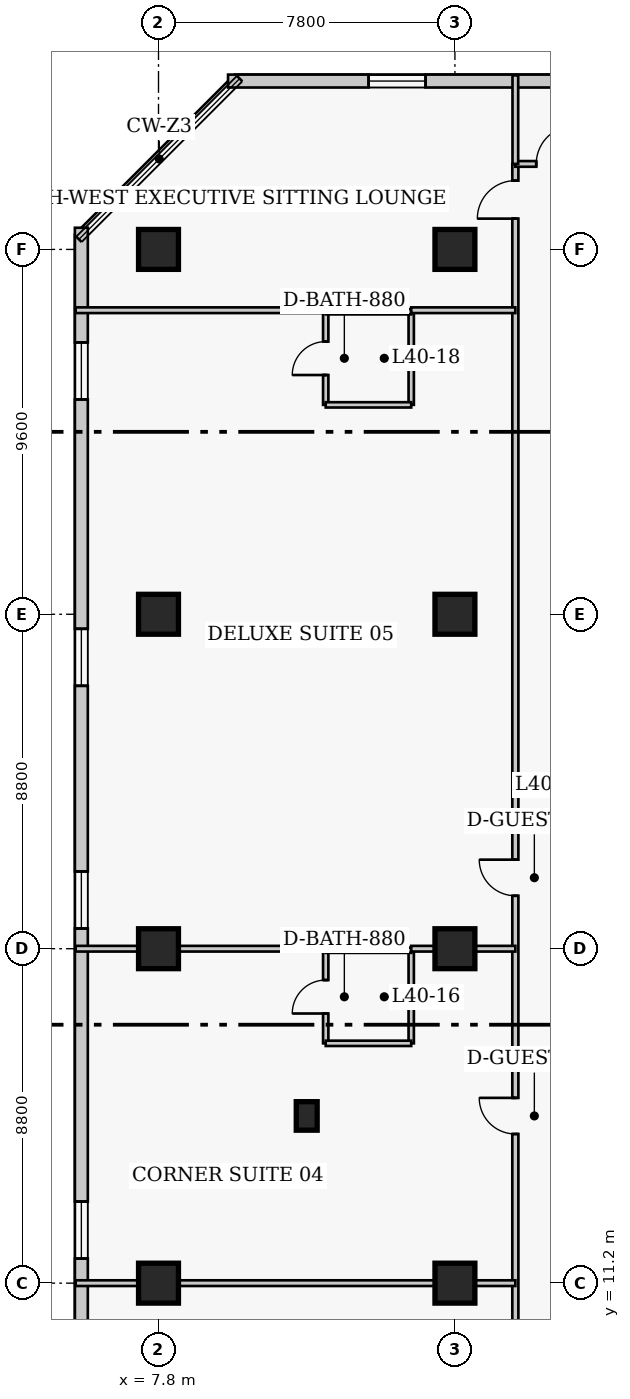
"""IFC4 building model, lengths in metres.
Left out: names, types, materials, properties, quantities, classifications, styles, units other than length and angle.
Written with IfcOpenShell. Run it as: python <this file> out.ifc"""

import sys

from ifc_helpers import new_model, si_unit, direction, frame, frame_2d, origin, origin_2d, place, context, subcontext, project, spatial, rectangle, extrude, element, fill, save


model = new_model("IFC4")
c1 = context("Model", 3, precision=1e-05, world=origin(), true_north=direction((0.0, 1.0)))
c2 = subcontext(c1, "Body", "Model", "MODEL_VIEW")
j1 = project(units=[si_unit("LENGTHUNIT", "METRE"), si_unit("PLANEANGLEUNIT", "RADIAN")], contexts=[c1])
p1 = place(None, origin())
s1 = spatial("IfcSite", under=j1, at=p1, CompositionType="ELEMENT")
p2 = place(p1, origin())
s2 = spatial("IfcBuilding", under=s1, at=p2, CompositionType="ELEMENT")
p3 = place(p2, frame((0.0, 0.0, 161.2)))
s3 = spatial("IfcBuildingStorey", under=s2, at=p3, CompositionType="ELEMENT", Elevation=161.2)
for number, where, z_axis, x_axis in (
    (1, (7.8, 11.2, 0.0), (0.0, 0.0, 1.0), (1.0, 0.0, 0.0)),
    (2, (7.8, 20.0, 0.0), (0.0, 0.0, 1.0), (1.0, 0.0, 0.0)),
    (3, (7.8, 28.8, 0.0), (0.0, 0.0, 1.0), (1.0, 0.0, 0.0)),
    (4, (7.8, 38.4, 0.0), (0.0, 0.0, 1.0), (1.0, 0.0, 0.0)),
    (5, (15.6, 11.2, 0.0), (0.0, 0.0, 1.0), (1.0, 0.0, 0.0)),
    (6, (15.6, 20.0, 0.0), (0.0, 0.0, 1.0), (1.0, 0.0, 0.0)),
    (7, (15.6, 28.8, 0.0), (0.0, 0.0, 1.0), (1.0, 0.0, 0.0)),
    (8, (15.6, 38.4, 0.0), (0.0, 0.0, 1.0), (1.0, 0.0, 0.0)),
):
    element("IfcColumn", number, at=place(p3, frame(where, z_axis=z_axis, x_axis=x_axis)), inside=s3, PredefinedType="COLUMN", context=c2, shape_type="SweptSolid", body=[
        extrude(rectangle(XDim=1.05, YDim=1.05, at=origin_2d()), origin(), (0.0, 0.0, 1.0), 3.8),
    ])
p4 = place(p3, frame((11.7, 15.6, 0.0), z_axis=(0.0, 0.0, 1.0), x_axis=(1.0, 0.0, 0.0)))
e9 = element("IfcColumn", 9, at=p4, inside=s3, PredefinedType="PILASTER", context=c2, shape_type="SweptSolid", body=[
    extrude(rectangle(XDim=0.55, YDim=0.75, at=origin_2d()), origin(), (0.0, 0.0, 1.0), 3.8),
])
p5 = place(p3, frame((36.32, 42.83, 0.0), z_axis=(0.0, 0.0, 1.0), x_axis=(-1.0, 0.0, 0.0)))
e10 = element("IfcWall", 10, at=p5, inside=s3, PredefinedType="SOLIDWALL", context=c2, shape_type="SweptSolid", body=[
    extrude(rectangle(XDim=26.69, YDim=0.34, at=frame_2d((13.345, 0.0))), origin(), (0.0, 0.0, 1.0), 3.55),
])
p6 = place(p5, frame((2.548, 0.0, 0.85)))
e11 = element("IfcOpeningElement", 11, at=p6, cuts=e10, PredefinedType="OPENING", context=c2, shape_type="SweptSolid", body=[
    extrude(rectangle(XDim=1.5, YDim=1.75, at=frame_2d((0.75, 0.875))), frame((0.0, 0.18, 0.0), z_axis=(0.0, -1.0, 0.0), x_axis=(1.0, 0.0, 0.0)), (0.0, 0.0, 1.0), 0.36),
])
p7 = place(p5, frame((12.595, 0.0, 0.85)))
e12 = element("IfcOpeningElement", 12, at=p7, cuts=e10, PredefinedType="OPENING", context=c2, shape_type="SweptSolid", body=[
    extrude(rectangle(XDim=1.5, YDim=1.75, at=frame_2d((0.75, 0.875))), frame((0.0, 0.18, 0.0), z_axis=(0.0, -1.0, 0.0), x_axis=(1.0, 0.0, 0.0)), (0.0, 0.0, 1.0), 0.36),
])
p8 = place(p5, frame((21.492, 0.0, 0.85)))
e13 = element("IfcOpeningElement", 13, at=p8, cuts=e10, PredefinedType="OPENING", context=c2, shape_type="SweptSolid", body=[
    extrude(rectangle(XDim=1.5, YDim=1.75, at=frame_2d((0.75, 0.875))), frame((0.0, 0.18, 0.0), z_axis=(0.0, -1.0, 0.0), x_axis=(1.0, 0.0, 0.0)), (0.0, 0.0, 1.0), 0.36),
])
p9 = place(p3, frame((5.77, 38.97, 0.0), z_axis=(0.0, 0.0, 1.0), x_axis=(0.0, -1.0, 0.0)))
e14 = element("IfcWall", 14, at=p9, inside=s3, PredefinedType="SOLIDWALL", context=c2, shape_type="SweptSolid", body=[
    extrude(rectangle(XDim=30.14, YDim=0.34, at=frame_2d((15.07, 0.0))), origin(), (0.0, 0.0, 1.0), 3.55),
])
p10 = place(p9, frame((3.018, 0.0, 0.85)))
e15 = element("IfcOpeningElement", 15, at=p10, cuts=e14, PredefinedType="OPENING", context=c2, shape_type="SweptSolid", body=[
    extrude(rectangle(XDim=1.5, YDim=1.75, at=frame_2d((0.75, 0.875))), frame((0.0, 0.18, 0.0), z_axis=(0.0, -1.0, 0.0), x_axis=(1.0, 0.0, 0.0)), (0.0, 0.0, 1.0), 0.36),
])
p11 = place(p9, frame((10.552, 0.0, 0.85)))
e16 = element("IfcOpeningElement", 16, at=p11, cuts=e14, PredefinedType="OPENING", context=c2, shape_type="SweptSolid", body=[
    extrude(rectangle(XDim=1.5, YDim=1.75, at=frame_2d((0.75, 0.875))), frame((0.0, 0.18, 0.0), z_axis=(0.0, -1.0, 0.0), x_axis=(1.0, 0.0, 0.0)), (0.0, 0.0, 1.0), 0.36),
])
p12 = place(p9, frame((16.938, 0.0, 0.85)))
e17 = element("IfcOpeningElement", 17, at=p12, cuts=e14, PredefinedType="OPENING", context=c2, shape_type="SweptSolid", body=[
    extrude(rectangle(XDim=1.5, YDim=1.75, at=frame_2d((0.75, 0.875))), frame((0.0, 0.18, 0.0), z_axis=(0.0, -1.0, 0.0), x_axis=(1.0, 0.0, 0.0)), (0.0, 0.0, 1.0), 0.36),
])
p13 = place(p9, frame((25.623, 0.0, 0.85)))
e18 = element("IfcOpeningElement", 18, at=p13, cuts=e14, PredefinedType="OPENING", context=c2, shape_type="SweptSolid", body=[
    extrude(rectangle(XDim=1.5, YDim=1.75, at=frame_2d((0.75, 0.875))), frame((0.0, 0.18, 0.0), z_axis=(0.0, -1.0, 0.0), x_axis=(1.0, 0.0, 0.0)), (0.0, 0.0, 1.0), 0.36),
])
p14 = place(p3, frame((17.19, 6.85, 0.0), z_axis=(0.0, 0.0, 1.0), x_axis=(0.0, 1.0, 0.0)))
e19 = element("IfcWall", 19, at=p14, inside=s3, PredefinedType="PARTITIONING", context=c2, shape_type="SweptSolid", body=[
    extrude(rectangle(XDim=33.8, YDim=0.16, at=frame_2d((16.9, 0.0))), origin(), (0.0, 0.0, 1.0), 3.55),
])
p15 = place(p14, frame((1.7, 0.0, 0.0)))
e20 = element("IfcOpeningElement", 20, at=p15, cuts=e19, PredefinedType="OPENING", context=c2, shape_type="SweptSolid", body=[
    extrude(rectangle(XDim=0.95, YDim=2.1, at=frame_2d((0.475, 1.05))), frame((0.0, 0.09, 0.0), z_axis=(0.0, -1.0, 0.0), x_axis=(1.0, 0.0, 0.0)), (0.0, 0.0, 1.0), 0.18),
])
p16 = place(p14, frame((8.275, 0.0, 0.0)))
e21 = element("IfcOpeningElement", 21, at=p16, cuts=e19, PredefinedType="OPENING", context=c2, shape_type="SweptSolid", body=[
    extrude(rectangle(XDim=0.95, YDim=2.1, at=frame_2d((0.475, 1.05))), frame((0.0, 0.09, 0.0), z_axis=(0.0, -1.0, 0.0), x_axis=(1.0, 0.0, 0.0)), (0.0, 0.0, 1.0), 0.18),
])
p17 = place(p14, frame((14.543, 0.0, 0.0)))
e22 = element("IfcOpeningElement", 22, at=p17, cuts=e19, PredefinedType="OPENING", context=c2, shape_type="SweptSolid", body=[
    extrude(rectangle(XDim=0.95, YDim=2.1, at=frame_2d((0.475, 1.05))), frame((0.0, 0.09, 0.0), z_axis=(0.0, -1.0, 0.0), x_axis=(1.0, 0.0, 0.0)), (0.0, 0.0, 1.0), 0.18),
])
p18 = place(p14, frame((32.36, 0.0, 0.0)))
e23 = element("IfcOpeningElement", 23, at=p18, cuts=e19, PredefinedType="OPENING", context=c2, shape_type="SweptSolid", body=[
    extrude(rectangle(XDim=1.0, YDim=2.15, at=frame_2d((0.5, 1.075))), frame((0.0, 0.09, 0.0), z_axis=(0.0, -1.0, 0.0), x_axis=(1.0, 0.0, 0.0)), (0.0, 0.0, 1.0), 0.18),
])
p19 = place(p3, frame((17.19, 40.65, 0.0), z_axis=(0.0, 0.0, 1.0), x_axis=(1.0, 0.0, 0.0)))
e24 = element("IfcWall", 24, at=p19, inside=s3, PredefinedType="PARTITIONING", context=c2, shape_type="SweptSolid", body=[
    extrude(rectangle(XDim=4.91, YDim=0.15, at=frame_2d((2.455, 0.0))), origin(), (0.0, 0.0, 1.0), 3.55),
])
p20 = place(p19, frame((0.55, 0.0, 0.0)))
e25 = element("IfcOpeningElement", 25, at=p20, cuts=e24, PredefinedType="OPENING", context=c2, shape_type="SweptSolid", body=[
    extrude(rectangle(XDim=1.0, YDim=2.15, at=frame_2d((0.5, 1.075))), frame((0.0, 0.085, 0.0), z_axis=(0.0, -1.0, 0.0), x_axis=(1.0, 0.0, 0.0)), (0.0, 0.0, 1.0), 0.17),
])
p21 = place(p3, frame((17.19, 40.65, 0.0), z_axis=(0.0, 0.0, 1.0), x_axis=(0.0, 1.0, 0.0)))
e26 = element("IfcWall", 26, at=p21, inside=s3, PredefinedType="PARTITIONING", context=c2, shape_type="SweptSolid", body=[
    extrude(rectangle(XDim=2.33, YDim=0.15, at=frame_2d((1.165, 0.0))), origin(), (0.0, 0.0, 1.0), 3.55),
])
p22 = place(p3, frame((5.62, 11.2, 0.0), z_axis=(0.0, 0.0, 1.0), x_axis=(1.0, 0.0, 0.0)))
e27 = element("IfcWall", 27, at=p22, inside=s3, PredefinedType="PARTITIONING", context=c2, shape_type="SweptSolid", body=[
    extrude(rectangle(XDim=11.57, YDim=0.15, at=frame_2d((5.785, 0.0))), origin(), (0.0, 0.0, 1.0), 2.778),
])
p23 = place(p3, frame((12.2, 17.51, 0.0), z_axis=(0.0, 0.0, 1.0), x_axis=(0.0, 1.0, 0.0)))
e28 = element("IfcWall", 28, at=p23, inside=s3, PredefinedType="PLUMBINGWALL", context=c2, shape_type="SweptSolid", body=[
    extrude(rectangle(XDim=2.45, YDim=0.14, at=frame_2d((1.225, 0.0))), origin(), (0.0, 0.0, 1.0), 3.55),
])
p24 = place(p23, frame((0.785, 0.0, 0.0)))
e29 = element("IfcOpeningElement", 29, at=p24, cuts=e28, PredefinedType="OPENING", context=c2, shape_type="SweptSolid", body=[
    extrude(rectangle(XDim=0.88, YDim=2.05, at=frame_2d((0.44, 1.025))), frame((0.0, 0.08, 0.0), z_axis=(0.0, -1.0, 0.0), x_axis=(1.0, 0.0, 0.0)), (0.0, 0.0, 1.0), 0.16),
])
p25 = place(p3, frame((14.45, 17.51, 0.0), z_axis=(0.0, 0.0, 1.0), x_axis=(0.0, 1.0, 0.0)))
e30 = element("IfcWall", 30, at=p25, inside=s3, PredefinedType="PLUMBINGWALL", context=c2, shape_type="SweptSolid", body=[
    extrude(rectangle(XDim=2.45, YDim=0.14, at=frame_2d((1.225, 0.0))), origin(), (0.0, 0.0, 1.0), 3.55),
])
p26 = place(p3, frame((12.2, 17.51, 0.0), z_axis=(0.0, 0.0, 1.0), x_axis=(1.0, 0.0, 0.0)))
e31 = element("IfcWall", 31, at=p26, inside=s3, PredefinedType="PLUMBINGWALL", context=c2, shape_type="SweptSolid", body=[
    extrude(rectangle(XDim=2.25, YDim=0.14, at=frame_2d((1.125, 0.0))), origin(), (0.0, 0.0, 1.0), 3.55),
])
p27 = place(p3, frame((12.2, 19.96, 0.0), z_axis=(0.0, 0.0, 1.0), x_axis=(1.0, 0.0, 0.0)))
e32 = element("IfcWall", 32, at=p27, inside=s3, PredefinedType="PLUMBINGWALL", context=c2, shape_type="SweptSolid", body=[
    extrude(rectangle(XDim=2.25, YDim=0.14, at=frame_2d((1.125, 0.0))), origin(), (0.0, 0.0, 1.0), 2.9),
])
p28 = place(p3, frame((5.62, 20.0, 0.0), z_axis=(0.0, 0.0, 1.0), x_axis=(1.0, 0.0, 0.0)))
e33 = element("IfcWall", 33, at=p28, inside=s3, PredefinedType="PARTITIONING", context=c2, shape_type="SweptSolid", body=[
    extrude(rectangle(XDim=6.58, YDim=0.15, at=frame_2d((3.29, 0.0))), origin(), (0.0, 0.0, 1.0), 2.778),
])
p29 = place(p3, frame((14.45, 20.0, 0.0), z_axis=(0.0, 0.0, 1.0), x_axis=(1.0, 0.0, 0.0)))
e34 = element("IfcWall", 34, at=p29, inside=s3, PredefinedType="PARTITIONING", context=c2, shape_type="SweptSolid", body=[
    extrude(rectangle(XDim=2.74, YDim=0.15, at=frame_2d((1.37, 0.0))), origin(), (0.0, 0.0, 1.0), 2.778),
])
p30 = place(p3, frame((12.2, 34.31, 0.0), z_axis=(0.0, 0.0, 1.0), x_axis=(0.0, 1.0, 0.0)))
e35 = element("IfcWall", 35, at=p30, inside=s3, PredefinedType="PLUMBINGWALL", context=c2, shape_type="SweptSolid", body=[
    extrude(rectangle(XDim=2.45, YDim=0.14, at=frame_2d((1.225, 0.0))), origin(), (0.0, 0.0, 1.0), 3.55),
])
p31 = place(p30, frame((0.785, 0.0, 0.0)))
e36 = element("IfcOpeningElement", 36, at=p31, cuts=e35, PredefinedType="OPENING", context=c2, shape_type="SweptSolid", body=[
    extrude(rectangle(XDim=0.88, YDim=2.05, at=frame_2d((0.44, 1.025))), frame((0.0, 0.08, 0.0), z_axis=(0.0, -1.0, 0.0), x_axis=(1.0, 0.0, 0.0)), (0.0, 0.0, 1.0), 0.16),
])
p32 = place(p3, frame((14.45, 34.31, 0.0), z_axis=(0.0, 0.0, 1.0), x_axis=(0.0, 1.0, 0.0)))
e37 = element("IfcWall", 37, at=p32, inside=s3, PredefinedType="PLUMBINGWALL", context=c2, shape_type="SweptSolid", body=[
    extrude(rectangle(XDim=2.45, YDim=0.14, at=frame_2d((1.225, 0.0))), origin(), (0.0, 0.0, 1.0), 3.55),
])
for number, where, z_axis, x_axis in (
    (38, (12.2, 34.31, 0.0), (0.0, 0.0, 1.0), (1.0, 0.0, 0.0)),
    (39, (12.2, 36.76, 0.0), (0.0, 0.0, 1.0), (1.0, 0.0, 0.0)),
):
    element("IfcWall", number, at=place(p3, frame(where, z_axis=z_axis, x_axis=x_axis)), inside=s3, PredefinedType="PLUMBINGWALL", context=c2, shape_type="SweptSolid", body=[
        extrude(rectangle(XDim=2.25, YDim=0.14, at=frame_2d((1.125, 0.0))), origin(), (0.0, 0.0, 1.0), 3.55),
    ])
p33 = place(p3, frame((5.62, 36.8, 0.0), z_axis=(0.0, 0.0, 1.0), x_axis=(1.0, 0.0, 0.0)))
e40 = element("IfcWall", 40, at=p33, inside=s3, PredefinedType="PARTITIONING", context=c2, shape_type="SweptSolid", body=[
    extrude(rectangle(XDim=6.58, YDim=0.15, at=frame_2d((3.29, 0.0))), origin(), (0.0, 0.0, 1.0), 3.55),
])
p34 = place(p3, frame((14.45, 36.8, 0.0), z_axis=(0.0, 0.0, 1.0), x_axis=(1.0, 0.0, 0.0)))
e41 = element("IfcWall", 41, at=p34, inside=s3, PredefinedType="PARTITIONING", context=c2, shape_type="SweptSolid", body=[
    extrude(rectangle(XDim=2.74, YDim=0.15, at=frame_2d((1.37, 0.0))), origin(), (0.0, 0.0, 1.0), 3.55),
])
p35 = place(p8, origin())
e42 = element("IfcWindow", 42, at=p35, inside=s3, PartitioningType="SINGLE_PANEL", PredefinedType="WINDOW", context=c2, shape_type="SweptSolid", body=[
    extrude(rectangle(XDim=1.5, YDim=1.75, at=frame_2d((0.75, 0.875))), frame((0.0, 0.03, 0.0), z_axis=(0.0, -1.0, 0.0), x_axis=(1.0, 0.0, 0.0)), (0.0, 0.0, 1.0), 0.06),
])
fill(e13, e42)
p36 = place(p10, origin())
e43 = element("IfcWindow", 43, at=p36, inside=s3, PartitioningType="SINGLE_PANEL", PredefinedType="WINDOW", context=c2, shape_type="SweptSolid", body=[
    extrude(rectangle(XDim=1.5, YDim=1.75, at=frame_2d((0.75, 0.875))), frame((0.0, 0.03, 0.0), z_axis=(0.0, -1.0, 0.0), x_axis=(1.0, 0.0, 0.0)), (0.0, 0.0, 1.0), 0.06),
])
fill(e15, e43)
p37 = place(p11, origin())
e44 = element("IfcWindow", 44, at=p37, inside=s3, PartitioningType="SINGLE_PANEL", PredefinedType="WINDOW", context=c2, shape_type="SweptSolid", body=[
    extrude(rectangle(XDim=1.5, YDim=1.75, at=frame_2d((0.75, 0.875))), frame((0.0, 0.03, 0.0), z_axis=(0.0, -1.0, 0.0), x_axis=(1.0, 0.0, 0.0)), (0.0, 0.0, 1.0), 0.06),
])
fill(e16, e44)
p38 = place(p12, origin())
e45 = element("IfcWindow", 45, at=p38, inside=s3, PartitioningType="SINGLE_PANEL", PredefinedType="WINDOW", context=c2, shape_type="SweptSolid", body=[
    extrude(rectangle(XDim=1.5, YDim=1.75, at=frame_2d((0.75, 0.875))), frame((0.0, 0.03, 0.0), z_axis=(0.0, -1.0, 0.0), x_axis=(1.0, 0.0, 0.0)), (0.0, 0.0, 1.0), 0.06),
])
fill(e17, e45)
p39 = place(p13, origin())
e46 = element("IfcWindow", 46, at=p39, inside=s3, PartitioningType="SINGLE_PANEL", PredefinedType="WINDOW", context=c2, shape_type="SweptSolid", body=[
    extrude(rectangle(XDim=1.5, YDim=1.75, at=frame_2d((0.75, 0.875))), frame((0.0, 0.03, 0.0), z_axis=(0.0, -1.0, 0.0), x_axis=(1.0, 0.0, 0.0)), (0.0, 0.0, 1.0), 0.06),
])
fill(e18, e46)
p40 = place(p20, origin())
e47 = element("IfcDoor", 47, at=p40, inside=s3, OperationType="SINGLE_SWING_RIGHT", PredefinedType="DOOR", context=c2, shape_type="SweptSolid", body=[
    extrude(rectangle(XDim=1.0, YDim=2.15, at=frame_2d((0.5, 1.075))), frame((0.0, 0.025, 0.0), z_axis=(0.0, -1.0, 0.0), x_axis=(1.0, 0.0, 0.0)), (0.0, 0.0, 1.0), 0.05),
])
fill(e25, e47)
p41 = place(p24, origin())
e48 = element("IfcDoor", 48, at=p41, inside=s3, OperationType="SINGLE_SWING_LEFT", PredefinedType="DOOR", context=c2, shape_type="SweptSolid", body=[
    extrude(rectangle(XDim=0.88, YDim=2.05, at=frame_2d((0.44, 1.025))), frame((0.0, 0.025, 0.0), z_axis=(0.0, -1.0, 0.0), x_axis=(1.0, 0.0, 0.0)), (0.0, 0.0, 1.0), 0.05),
])
fill(e29, e48)
p42 = place(p16, origin())
e49 = element("IfcDoor", 49, at=p42, inside=s3, OperationType="SINGLE_SWING_RIGHT", PredefinedType="DOOR", context=c2, shape_type="SweptSolid", body=[
    extrude(rectangle(XDim=0.95, YDim=2.1, at=frame_2d((0.475, 1.05))), frame((0.0, 0.025, 0.0), z_axis=(0.0, -1.0, 0.0), x_axis=(1.0, 0.0, 0.0)), (0.0, 0.0, 1.0), 0.05),
])
fill(e21, e49)
p43 = place(p31, origin())
e50 = element("IfcDoor", 50, at=p43, inside=s3, OperationType="SINGLE_SWING_LEFT", PredefinedType="DOOR", context=c2, shape_type="SweptSolid", body=[
    extrude(rectangle(XDim=0.88, YDim=2.05, at=frame_2d((0.44, 1.025))), frame((0.0, 0.025, 0.0), z_axis=(0.0, -1.0, 0.0), x_axis=(1.0, 0.0, 0.0)), (0.0, 0.0, 1.0), 0.05),
])
fill(e36, e50)
p44 = place(p17, origin())
e51 = element("IfcDoor", 51, at=p44, inside=s3, OperationType="SINGLE_SWING_RIGHT", PredefinedType="DOOR", context=c2, shape_type="SweptSolid", body=[
    extrude(rectangle(XDim=0.95, YDim=2.1, at=frame_2d((0.475, 1.05))), frame((0.0, 0.025, 0.0), z_axis=(0.0, -1.0, 0.0), x_axis=(1.0, 0.0, 0.0)), (0.0, 0.0, 1.0), 0.05),
])
fill(e22, e51)
p45 = place(p18, origin())
e52 = element("IfcDoor", 52, at=p45, inside=s3, OperationType="SINGLE_SWING_LEFT", PredefinedType="DOOR", context=c2, shape_type="SweptSolid", body=[
    extrude(rectangle(XDim=1.0, YDim=2.15, at=frame_2d((0.5, 1.075))), frame((0.0, 0.025, 0.0), z_axis=(0.0, -1.0, 0.0), x_axis=(1.0, 0.0, 0.0)), (0.0, 0.0, 1.0), 0.05),
])
fill(e23, e52)
save(model, sys.argv[1])
